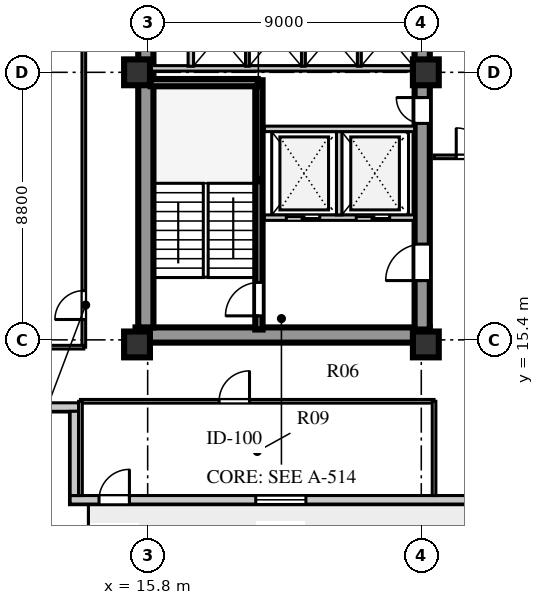
"""IFC4 building model, lengths in metres.
Left out: names, types, materials, properties, quantities, classifications, styles, units other than length and angle.
Written with IfcOpenShell. Run it as: python <this file> out.ifc"""

import sys

from ifc_helpers import new_model, si_unit, direction, frame, frame_2d, origin, origin_2d, place, context, subcontext, project, spatial, rectangle, extrude, element, fill, save


model = new_model("IFC4")
c1 = context("Model", 3, precision=1e-05, world=origin(), true_north=direction((0.0, 1.0)))
c2 = subcontext(c1, "Body", "Model", "MODEL_VIEW")
j1 = project(units=[si_unit("LENGTHUNIT", "METRE"), si_unit("PLANEANGLEUNIT", "RADIAN")], contexts=[c1])
p1 = place(None, origin())
s1 = spatial("IfcSite", under=j1, at=p1, CompositionType="ELEMENT")
p2 = place(p1, origin())
s2 = spatial("IfcBuilding", under=s1, at=p2, CompositionType="ELEMENT")
p3 = place(p2, frame((0.0, 0.0, 104.0)))
s3 = spatial("IfcBuildingStorey", under=s2, at=p3, CompositionType="ELEMENT", Elevation=104.0)
p4 = place(p3, frame((15.4, 15.56, 0.0), z_axis=(0.0, 0.0, 1.0), x_axis=(1.0, 0.0, 0.0)))
e1 = element("IfcWall", 1, at=p4, inside=s3, PredefinedType="SHEAR", context=c2, shape_type="SweptSolid", body=[
    extrude(rectangle(XDim=9.68, YDim=0.5, at=frame_2d((4.84, 0.0))), origin(), (0.0, 0.0, 1.0), 3.6),
])
p5 = place(p3, frame((15.74, 15.81, 0.0), z_axis=(0.0, 0.0, 1.0), x_axis=(0.0, 1.0, 0.0)))
e2 = element("IfcWall", 2, at=p5, inside=s3, PredefinedType="SHEAR", context=c2, shape_type="SweptSolid", body=[
    extrude(rectangle(XDim=25.63, YDim=0.5, at=frame_2d((12.815, 0.0))), origin(), (0.0, 0.0, 1.0), 3.6),
])
p6 = place(p3, frame((24.83, 15.74, 0.0), z_axis=(0.0, 0.0, 1.0), x_axis=(0.0, 1.0, 0.0)))
e3 = element("IfcWall", 3, at=p6, inside=s3, PredefinedType="SHEAR", context=c2, shape_type="SweptSolid", body=[
    extrude(rectangle(XDim=25.76, YDim=0.5, at=frame_2d((12.88, 0.0))), origin(), (0.0, 0.0, 1.0), 3.6),
])
p7 = place(p6, frame((1.61, 0.0, 0.0)))
e4 = element("IfcOpeningElement", 4, at=p7, cuts=e3, PredefinedType="OPENING", context=c2, shape_type="SweptSolid", body=[
    extrude(rectangle(XDim=1.2, YDim=2.1, at=frame_2d((0.6, 1.05))), frame((0.0, 0.26, 0.0), z_axis=(0.0, -1.0, 0.0), x_axis=(1.0, 0.0, 0.0)), (0.0, 0.0, 1.0), 0.52),
])
p8 = place(p6, frame((6.78, 0.0, 0.0)))
e5 = element("IfcOpeningElement", 5, at=p8, cuts=e3, PredefinedType="OPENING", context=c2, shape_type="SweptSolid", body=[
    extrude(rectangle(XDim=0.85, YDim=2.06, at=frame_2d((0.425, 1.03))), frame((0.0, 0.26, 0.0), z_axis=(0.0, -1.0, 0.0), x_axis=(1.0, 0.0, 0.0)), (0.0, 0.0, 1.0), 0.52),
])
p9 = place(p6, frame((12.11, 0.0, 0.0)))
e6 = element("IfcOpeningElement", 6, at=p9, cuts=e3, PredefinedType="OPENING", context=c2, shape_type="SweptSolid", body=[
    extrude(rectangle(XDim=1.5, YDim=2.12, at=frame_2d((0.75, 1.06))), frame((0.0, 0.26, 0.0), z_axis=(0.0, -1.0, 0.0), x_axis=(1.0, 0.0, 0.0)), (0.0, 0.0, 1.0), 0.52),
])
p10 = place(p6, frame((20.11, 0.0, 0.0)))
e7 = element("IfcOpeningElement", 7, at=p10, cuts=e3, PredefinedType="OPENING", context=c2, shape_type="SweptSolid", body=[
    extrude(rectangle(XDim=1.2, YDim=2.12, at=frame_2d((0.6, 1.06))), frame((0.0, 0.26, 0.0), z_axis=(0.0, -1.0, 0.0), x_axis=(1.0, 0.0, 0.0)), (0.0, 0.0, 1.0), 0.52),
])
p11 = place(p6, frame((24.01, 0.0, 0.0)))
e8 = element("IfcOpeningElement", 8, at=p11, cuts=e3, PredefinedType="OPENING", context=c2, shape_type="SweptSolid", body=[
    extrude(rectangle(XDim=0.95, YDim=2.1, at=frame_2d((0.475, 1.05))), frame((0.0, 0.26, 0.0), z_axis=(0.0, -1.0, 0.0), x_axis=(1.0, 0.0, 0.0)), (0.0, 0.0, 1.0), 0.52),
])
for number, where, z_axis, x_axis in (
    (9, (15.45, 15.25, 0.0), (0.0, 0.0, 1.0), (1.0, 0.0, 0.0)),
    (10, (15.45, 24.2, 0.0), (0.0, 0.0, 1.0), (1.0, 0.0, 0.0)),
    (11, (24.95, 15.25, 0.0), (0.0, 0.0, 1.0), (1.0, 0.0, 0.0)),
    (12, (24.95, 24.2, 0.0), (0.0, 0.0, 1.0), (1.0, 0.0, 0.0)),
):
    element("IfcColumn", number, at=place(p3, frame(where, z_axis=z_axis, x_axis=x_axis)), inside=s3, PredefinedType="COLUMN", context=c2, shape_type="SweptSolid", body=[
        extrude(rectangle(XDim=0.85, YDim=0.85, at=origin_2d()), origin(), (0.0, 0.0, 1.0), 3.6),
    ])
p12 = place(p3, frame((13.25, 10.14, 0.0), z_axis=(0.0, 0.0, 1.0), x_axis=(1.0, 0.0, 0.0)))
e13 = element("IfcWall", 13, at=p12, inside=s3, PredefinedType="STANDARD", context=c2, shape_type="SweptSolid", body=[
    extrude(rectangle(XDim=32.1, YDim=0.28, at=frame_2d((16.05, 0.0))), origin(), (0.0, 0.0, 1.0), 3.6),
])
p13 = place(p12, frame((0.95, 0.0, 0.0)))
e14 = element("IfcOpeningElement", 14, at=p13, cuts=e13, PredefinedType="OPENING", context=c2, shape_type="SweptSolid", body=[
    extrude(rectangle(XDim=1.0, YDim=2.05, at=frame_2d((0.5, 1.025))), frame((0.0, 0.15, 0.0), z_axis=(0.0, -1.0, 0.0), x_axis=(1.0, 0.0, 0.0)), (0.0, 0.0, 1.0), 0.3),
])
p14 = place(p12, frame((6.105, 0.0, 0.8)))
e15 = element("IfcOpeningElement", 15, at=p14, cuts=e13, PredefinedType="OPENING", context=c2, shape_type="SweptSolid", body=[
    extrude(rectangle(XDim=1.65, YDim=1.95, at=frame_2d((0.825, 0.975))), frame((0.0, 0.15, 0.0), z_axis=(0.0, -1.0, 0.0), x_axis=(1.0, 0.0, 0.0)), (0.0, 0.0, 1.0), 0.3),
])
p15 = place(p12, frame((17.69, 0.0, 0.8)))
e16 = element("IfcOpeningElement", 16, at=p15, cuts=e13, PredefinedType="OPENING", context=c2, shape_type="SweptSolid", body=[
    extrude(rectangle(XDim=1.95, YDim=2.0, at=frame_2d((0.975, 1.0))), frame((0.0, 0.15, 0.0), z_axis=(0.0, -1.0, 0.0), x_axis=(1.0, 0.0, 0.0)), (0.0, 0.0, 1.0), 0.3),
])
p16 = place(p12, frame((25.865, 0.0, 0.8)))
e17 = element("IfcOpeningElement", 17, at=p16, cuts=e13, PredefinedType="OPENING", context=c2, shape_type="SweptSolid", body=[
    extrude(rectangle(XDim=1.2, YDim=1.75, at=frame_2d((0.6, 0.875))), frame((0.0, 0.15, 0.0), z_axis=(0.0, -1.0, 0.0), x_axis=(1.0, 0.0, 0.0)), (0.0, 0.0, 1.0), 0.3),
])
p17 = place(p12, frame((28.88, 0.0, 0.8)))
e18 = element("IfcOpeningElement", 18, at=p17, cuts=e13, PredefinedType="OPENING", context=c2, shape_type="SweptSolid", body=[
    extrude(rectangle(XDim=1.8, YDim=2.0, at=frame_2d((0.9, 1.0))), frame((0.0, 0.15, 0.0), z_axis=(0.0, -1.0, 0.0), x_axis=(1.0, 0.0, 0.0)), (0.0, 0.0, 1.0), 0.3),
])
p18 = place(p3, frame((10.2, 13.19, 0.0), z_axis=(0.0, 0.0, 1.0), x_axis=(1.0, 0.0, 0.0)))
e19 = element("IfcWall", 19, at=p18, inside=s3, PredefinedType="STANDARD", context=c2, shape_type="SweptSolid", body=[
    extrude(rectangle(XDim=3.33, YDim=0.28, at=frame_2d((1.665, 0.0))), origin(), (0.0, 0.0, 1.0), 3.6),
])
p19 = place(p3, frame((13.39, 13.05, 0.0), z_axis=(0.0, 0.0, 1.0), x_axis=(0.0, -1.0, 0.0)))
e20 = element("IfcWall", 20, at=p19, inside=s3, PredefinedType="STANDARD", context=c2, shape_type="SweptSolid", body=[
    extrude(rectangle(XDim=2.77, YDim=0.28, at=frame_2d((1.385, 0.0))), origin(), (0.0, 0.0, 1.0), 3.6),
])
p20 = place(p3, frame((19.46, 15.74, 0.0), z_axis=(0.0, 0.0, 1.0), x_axis=(0.0, 1.0, 0.0)))
e21 = element("IfcWall", 21, at=p20, inside=s3, PredefinedType="SHEAR", context=c2, shape_type="SweptSolid", body=[
    extrude(rectangle(XDim=8.2, YDim=0.24, at=frame_2d((4.1, 0.0))), origin(), (0.0, 0.0, 1.0), 3.85),
])
p21 = place(p20, frame((0.45, 0.0, 0.0)))
e22 = element("IfcOpeningElement", 22, at=p21, cuts=e21, PredefinedType="OPENING", context=c2, shape_type="SweptSolid", body=[
    extrude(rectangle(XDim=1.1, YDim=2.1, at=frame_2d((0.55, 1.05))), frame((0.0, 0.13, 0.0), z_axis=(0.0, -1.0, 0.0), x_axis=(1.0, 0.0, 0.0)), (0.0, 0.0, 1.0), 0.26),
])
p22 = place(p3, frame((15.9, 23.86, 0.0), z_axis=(0.0, 0.0, 1.0), x_axis=(1.0, 0.0, 0.0)))
e23 = element("IfcWall", 23, at=p22, inside=s3, PredefinedType="SHEAR", context=c2, shape_type="SweptSolid", body=[
    extrude(rectangle(XDim=3.52, YDim=0.24, at=frame_2d((1.76, 0.0))), origin(), (0.0, 0.0, 1.0), 3.85),
])
p23 = place(p3, frame((19.64, 19.42, 0.0), z_axis=(0.0, 0.0, 1.0), x_axis=(1.0, 0.0, 0.0)))
e24 = element("IfcWall", 24, at=p23, inside=s3, PredefinedType="SOLIDWALL", context=c2, shape_type="SweptSolid", body=[
    extrude(rectangle(XDim=4.94, YDim=0.18, at=frame_2d((2.47, 0.0))), origin(), (0.0, 0.0, 1.0), 3.6),
])
p24 = place(p23, frame((0.72, 0.0, 0.0)))
e25 = element("IfcOpeningElement", 25, at=p24, cuts=e24, PredefinedType="OPENING", context=c2, shape_type="SweptSolid", body=[
    extrude(rectangle(XDim=1.1, YDim=2.1, at=frame_2d((0.55, 1.05))), frame((0.0, 0.1, 0.0), z_axis=(0.0, -1.0, 0.0), x_axis=(1.0, 0.0, 0.0)), (0.0, 0.0, 1.0), 0.2),
])
p25 = place(p23, frame((3.02, 0.0, 0.0)))
e26 = element("IfcOpeningElement", 26, at=p25, cuts=e24, PredefinedType="OPENING", context=c2, shape_type="SweptSolid", body=[
    extrude(rectangle(XDim=1.1, YDim=2.1, at=frame_2d((0.55, 1.05))), frame((0.0, 0.1, 0.0), z_axis=(0.0, -1.0, 0.0), x_axis=(1.0, 0.0, 0.0)), (0.0, 0.0, 1.0), 0.2),
])
p26 = place(p3, frame((22.1, 19.51, 0.0), z_axis=(0.0, 0.0, 1.0), x_axis=(0.0, 1.0, 0.0)))
e27 = element("IfcWall", 27, at=p26, inside=s3, PredefinedType="SOLIDWALL", context=c2, shape_type="SweptSolid", body=[
    extrude(rectangle(XDim=2.74, YDim=0.18, at=frame_2d((1.37, 0.0))), origin(), (0.0, 0.0, 1.0), 3.6),
])
p27 = place(p3, frame((19.64, 22.34, 0.0), z_axis=(0.0, 0.0, 1.0), x_axis=(1.0, 0.0, 0.0)))
e28 = element("IfcWall", 28, at=p27, inside=s3, PredefinedType="SOLIDWALL", context=c2, shape_type="SweptSolid", body=[
    extrude(rectangle(XDim=4.94, YDim=0.18, at=frame_2d((2.47, 0.0))), origin(), (0.0, 0.0, 1.0), 3.6),
])
p28 = place(p3, frame((15.9, 24.33, 0.0), z_axis=(0.0, 0.0, 1.0), x_axis=(1.0, 0.0, 0.0)))
e29 = element("IfcWall", 29, at=p28, inside=s3, PredefinedType="SOLIDWALL", context=c2, shape_type="SweptSolid", body=[
    extrude(rectangle(XDim=8.68, YDim=0.18, at=frame_2d((4.34, 0.0))), origin(), (0.0, 0.0, 1.0), 2.95),
])
p29 = place(p3, frame((17.22, 24.4, 0.0), z_axis=(0.0, 0.0, 1.0), x_axis=(0.0, 1.0, 0.0)))
e30 = element("IfcWall", 30, at=p29, inside=s3, PredefinedType="SOLIDWALL", context=c2, shape_type="SweptSolid", body=[
    extrude(rectangle(XDim=2.05, YDim=0.18, at=frame_2d((1.025, 0.0))), origin(), (0.0, 0.0, 1.0), 3.6),
])
for number, where, z_axis, x_axis in (
    (31, (19.08, 24.4, 0.0), (0.0, 0.0, 1.0), (0.0, 1.0, 0.0)),
    (32, (20.92, 24.4, 0.0), (0.0, 0.0, 1.0), (0.0, 1.0, 0.0)),
    (33, (22.76, 24.4, 0.0), (0.0, 0.0, 1.0), (0.0, 1.0, 0.0)),
):
    element("IfcWall", number, at=place(p3, frame(where, z_axis=z_axis, x_axis=x_axis)), inside=s3, PredefinedType="PARTITIONING", context=c2, shape_type="SweptSolid", body=[
        extrude(rectangle(XDim=2.05, YDim=0.12, at=frame_2d((1.025, 0.0))), origin(), (0.0, 0.0, 1.0), 3.6),
    ])
p30 = place(p3, frame((25.22, 21.42, 0.0), z_axis=(0.0, 0.0, 1.0), x_axis=(1.0, 0.0, 0.0)))
e34 = element("IfcWall", 34, at=p30, inside=s3, PredefinedType="PARTITIONING", context=c2, shape_type="SweptSolid", body=[
    extrude(rectangle(XDim=15.6, YDim=0.12, at=frame_2d((7.8, 0.0))), origin(), (0.0, 0.0, 1.0), 3.2),
])
p31 = place(p30, frame((0.73, 0.0, 0.0)))
e35 = element("IfcOpeningElement", 35, at=p31, cuts=e34, PredefinedType="OPENING", context=c2, shape_type="SweptSolid", body=[
    extrude(rectangle(XDim=0.95, YDim=2.1, at=frame_2d((0.475, 1.05))), frame((0.0, 0.07, 0.0), z_axis=(0.0, -1.0, 0.0), x_axis=(1.0, 0.0, 0.0)), (0.0, 0.0, 1.0), 0.14),
])
p32 = place(p3, frame((13.7, 15.16, 0.0), z_axis=(0.0, 0.0, 1.0), x_axis=(0.0, 1.0, 0.0)))
e36 = element("IfcWall", 36, at=p32, inside=s3, PredefinedType="PARTITIONING", context=c2, shape_type="SweptSolid", body=[
    extrude(rectangle(XDim=26.88, YDim=0.12, at=frame_2d((13.44, 0.0))), origin(), (0.0, 0.0, 1.0), 3.6),
])
p33 = place(p32, frame((0.91, 0.0, 0.0)))
e37 = element("IfcOpeningElement", 37, at=p33, cuts=e36, PredefinedType="OPENING", context=c2, shape_type="SweptSolid", body=[
    extrude(rectangle(XDim=0.95, YDim=2.1, at=frame_2d((0.475, 1.05))), frame((0.0, 0.07, 0.0), z_axis=(0.0, -1.0, 0.0), x_axis=(1.0, 0.0, 0.0)), (0.0, 0.0, 1.0), 0.14),
])
p34 = place(p3, frame((10.48, 15.16, 0.0), z_axis=(0.0, 0.0, 1.0), x_axis=(1.0, 0.0, 0.0)))
e38 = element("IfcWall", 38, at=p34, inside=s3, PredefinedType="PARTITIONING", context=c2, shape_type="SweptSolid", body=[
    extrude(rectangle(XDim=3.22, YDim=0.12, at=frame_2d((1.61, 0.0))), origin(), (0.0, 0.0, 1.0), 3.1),
])
p35 = place(p3, frame((13.59, 13.38, 0.0), z_axis=(0.0, 0.0, 1.0), x_axis=(1.0, 0.0, 0.0)))
e39 = element("IfcWall", 39, at=p35, inside=s3, PredefinedType="PARTITIONING", context=c2, shape_type="SweptSolid", body=[
    extrude(rectangle(XDim=11.63, YDim=0.12, at=frame_2d((5.815, 0.0))), origin(), (0.0, 0.0, 1.0), 3.6),
])
p36 = place(p35, frame((4.56, 0.0, 0.0)))
e40 = element("IfcOpeningElement", 40, at=p36, cuts=e39, PredefinedType="OPENING", context=c2, shape_type="SweptSolid", body=[
    extrude(rectangle(XDim=1.0, YDim=2.08, at=frame_2d((0.5, 1.04))), frame((0.0, 0.07, 0.0), z_axis=(0.0, -1.0, 0.0), x_axis=(1.0, 0.0, 0.0)), (0.0, 0.0, 1.0), 0.14),
])
p37 = place(p3, frame((13.59, 10.28, 0.0), z_axis=(0.0, 0.0, 1.0), x_axis=(0.0, 1.0, 0.0)))
e41 = element("IfcWall", 41, at=p37, inside=s3, PredefinedType="PARTITIONING", context=c2, shape_type="SweptSolid", body=[
    extrude(rectangle(XDim=3.1, YDim=0.12, at=frame_2d((1.55, 0.0))), origin(), (0.0, 0.0, 1.0), 3.6),
])
p38 = place(p3, frame((25.22, 10.28, 0.0), z_axis=(0.0, 0.0, 1.0), x_axis=(0.0, 1.0, 0.0)))
e42 = element("IfcWall", 42, at=p38, inside=s3, PredefinedType="PARTITIONING", context=c2, shape_type="SweptSolid", body=[
    extrude(rectangle(XDim=3.1, YDim=0.12, at=frame_2d((1.55, 0.0))), origin(), (0.0, 0.0, 1.0), 3.1),
])
p39 = place(p13, frame((1.0, 0.0, 0.0), z_axis=(0.0, 0.0, 1.0), x_axis=(-1.0, 0.0, 0.0)))
e43 = element("IfcDoor", 43, at=p39, inside=s3, OperationType="SINGLE_SWING_LEFT", PredefinedType="DOOR", context=c2, shape_type="SweptSolid", body=[
    extrude(rectangle(XDim=1.0, YDim=2.05, at=frame_2d((0.5, 1.025))), frame((0.0, 0.025, 0.0), z_axis=(0.0, -1.0, 0.0), x_axis=(1.0, 0.0, 0.0)), (0.0, 0.0, 1.0), 0.05),
])
fill(e14, e43)
p40 = place(p14, origin())
e44 = element("IfcWindow", 44, at=p40, inside=s3, PartitioningType="SINGLE_PANEL", PredefinedType="WINDOW", context=c2, shape_type="SweptSolid", body=[
    extrude(rectangle(XDim=1.65, YDim=1.95, at=frame_2d((0.825, 0.975))), frame((0.0, 0.03, 0.0), z_axis=(0.0, -1.0, 0.0), x_axis=(1.0, 0.0, 0.0)), (0.0, 0.0, 1.0), 0.06),
])
fill(e15, e44)
p41 = place(p21, origin())
e45 = element("IfcDoor", 45, at=p41, inside=s3, OperationType="SINGLE_SWING_LEFT", PredefinedType="DOOR", context=c2, shape_type="SweptSolid", body=[
    extrude(rectangle(XDim=1.1, YDim=2.1, at=frame_2d((0.55, 1.05))), frame((0.0, 0.025, 0.0), z_axis=(0.0, -1.0, 0.0), x_axis=(1.0, 0.0, 0.0)), (0.0, 0.0, 1.0), 0.05),
])
fill(e22, e45)
p42 = place(p24, origin())
e46 = element("IfcDoor", 46, at=p42, inside=s3, OperationType="DOUBLE_DOOR_SLIDING", PredefinedType="DOOR", context=c2, shape_type="SweptSolid", body=[
    extrude(rectangle(XDim=1.1, YDim=2.1, at=frame_2d((0.55, 1.05))), frame((0.0, 0.025, 0.0), z_axis=(0.0, -1.0, 0.0), x_axis=(1.0, 0.0, 0.0)), (0.0, 0.0, 1.0), 0.05),
])
fill(e25, e46)
p43 = place(p25, origin())
e47 = element("IfcDoor", 47, at=p43, inside=s3, OperationType="DOUBLE_DOOR_SLIDING", PredefinedType="DOOR", context=c2, shape_type="SweptSolid", body=[
    extrude(rectangle(XDim=1.1, YDim=2.1, at=frame_2d((0.55, 1.05))), frame((0.0, 0.025, 0.0), z_axis=(0.0, -1.0, 0.0), x_axis=(1.0, 0.0, 0.0)), (0.0, 0.0, 1.0), 0.05),
])
fill(e26, e47)
p44 = place(p7, frame((1.2, 0.0, 0.0), z_axis=(0.0, 0.0, 1.0), x_axis=(-1.0, 0.0, 0.0)))
e48 = element("IfcDoor", 48, at=p44, inside=s3, OperationType="SINGLE_SWING_RIGHT", PredefinedType="DOOR", context=c2, shape_type="SweptSolid", body=[
    extrude(rectangle(XDim=1.2, YDim=2.1, at=frame_2d((0.6, 1.05))), frame((0.0, 0.025, 0.0), z_axis=(0.0, -1.0, 0.0), x_axis=(1.0, 0.0, 0.0)), (0.0, 0.0, 1.0), 0.05),
])
fill(e4, e48)
p45 = place(p8, frame((0.85, 0.0, 0.0), z_axis=(0.0, 0.0, 1.0), x_axis=(-1.0, 0.0, 0.0)))
e49 = element("IfcDoor", 49, at=p45, inside=s3, OperationType="SINGLE_SWING_LEFT", PredefinedType="DOOR", context=c2, shape_type="SweptSolid", body=[
    extrude(rectangle(XDim=0.85, YDim=2.06, at=frame_2d((0.425, 1.03))), frame((0.0, 0.025, 0.0), z_axis=(0.0, -1.0, 0.0), x_axis=(1.0, 0.0, 0.0)), (0.0, 0.0, 1.0), 0.05),
])
fill(e5, e49)
p46 = place(p36, frame((1.0, 0.0, 0.0), z_axis=(0.0, 0.0, 1.0), x_axis=(-1.0, 0.0, 0.0)))
e50 = element("IfcDoor", 50, at=p46, inside=s3, OperationType="SINGLE_SWING_LEFT", PredefinedType="DOOR", context=c2, shape_type="SweptSolid", body=[
    extrude(rectangle(XDim=1.0, YDim=2.08, at=frame_2d((0.5, 1.04))), frame((0.0, 0.025, 0.0), z_axis=(0.0, -1.0, 0.0), x_axis=(1.0, 0.0, 0.0)), (0.0, 0.0, 1.0), 0.05),
])
fill(e40, e50)
p47 = place(p33, origin())
e51 = element("IfcDoor", 51, at=p47, inside=s3, OperationType="SINGLE_SWING_LEFT", PredefinedType="DOOR", context=c2, shape_type="SweptSolid", body=[
    extrude(rectangle(XDim=0.95, YDim=2.1, at=frame_2d((0.475, 1.05))), frame((0.0, 0.025, 0.0), z_axis=(0.0, -1.0, 0.0), x_axis=(1.0, 0.0, 0.0)), (0.0, 0.0, 1.0), 0.05),
])
fill(e37, e51)
p48 = place(p31, frame((0.95, 0.0, 0.0), z_axis=(0.0, 0.0, 1.0), x_axis=(-1.0, 0.0, 0.0)))
e52 = element("IfcDoor", 52, at=p48, inside=s3, OperationType="SINGLE_SWING_RIGHT", PredefinedType="DOOR", context=c2, shape_type="SweptSolid", body=[
    extrude(rectangle(XDim=0.95, YDim=2.1, at=frame_2d((0.475, 1.05))), frame((0.0, 0.025, 0.0), z_axis=(0.0, -1.0, 0.0), x_axis=(1.0, 0.0, 0.0)), (0.0, 0.0, 1.0), 0.05),
])
fill(e35, e52)
save(model, sys.argv[1])
